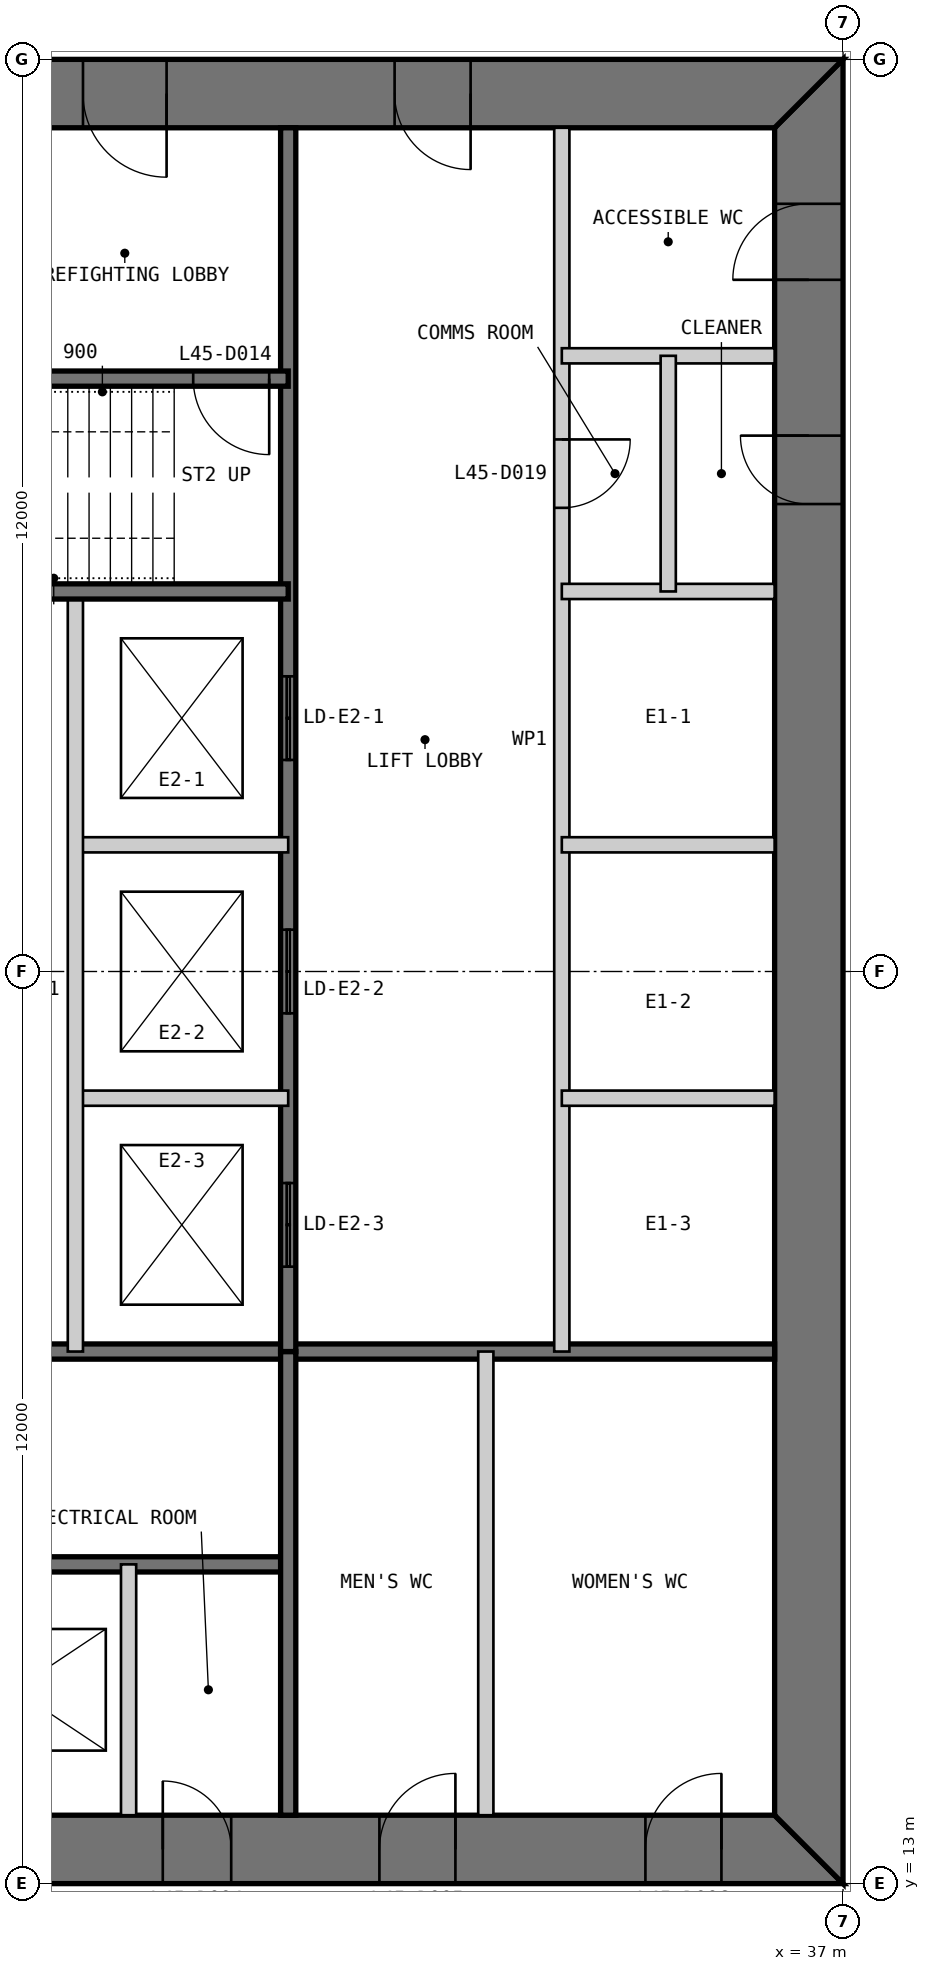
"""IFC4 building model, lengths in metres.
Left out: names, types, materials, properties, quantities, classifications, styles, units other than length and angle.
Written with IfcOpenShell. Run it as: python <this file> out.ifc"""

import sys

from ifc_helpers import new_model, si_unit, direction, frame, frame_2d, origin, place, context, subcontext, project, spatial, polyline, rectangle, outline, extrude, element, fill, save


model = new_model("IFC4")
c1 = context("Model", 3, precision=1e-05, world=origin(), true_north=direction((0.0, 1.0)))
c2 = subcontext(c1, "Body", "Model", "MODEL_VIEW")
j1 = project(units=[si_unit("LENGTHUNIT", "METRE"), si_unit("PLANEANGLEUNIT", "RADIAN")], contexts=[c1])
p1 = place(None, origin())
s1 = spatial("IfcSite", under=j1, at=p1, CompositionType="ELEMENT")
p2 = place(p1, origin())
s2 = spatial("IfcBuilding", under=s1, at=p2, CompositionType="ELEMENT")
p3 = place(p2, frame((0.0, 0.0, 193.8)))
s3 = spatial("IfcBuildingStorey", under=s2, at=p3, CompositionType="ELEMENT", Elevation=193.8)
p4 = place(p3, frame((13.0, 13.45, 0.0), z_axis=(0.0, 0.0, 1.0), x_axis=(1.0, 0.0, 0.0)))
e1 = element("IfcWall", 1, at=p4, inside=s3, PredefinedType="SHEAR", context=c2, shape_type="SweptSolid", body=[
    extrude(outline(polyline([(0.0, -0.45), (24.0, -0.45), (23.1, 0.45), (0.9, 0.45), (0.0, -0.45)])), origin(), (0.0, 0.0, 1.0), 4.0),
])
p5 = place(p4, frame((4.9, 0.0, 0.0)))
e2 = element("IfcOpeningElement", 2, at=p5, cuts=e1, PredefinedType="OPENING", context=c2, shape_type="SweptSolid", body=[
    extrude(rectangle(XDim=1.0, YDim=2.2, at=frame_2d((0.5, 1.1))), frame((0.0, 0.46, 0.0), z_axis=(0.0, -1.0, 0.0), x_axis=(1.0, 0.0, 0.0)), (0.0, 0.0, 1.0), 0.92),
])
p6 = place(p4, frame((8.9, 0.0, 0.0)))
e3 = element("IfcOpeningElement", 3, at=p6, cuts=e1, PredefinedType="OPENING", context=c2, shape_type="SweptSolid", body=[
    extrude(rectangle(XDim=1.1, YDim=2.2, at=frame_2d((0.55, 1.1))), frame((0.0, 0.46, 0.0), z_axis=(0.0, -1.0, 0.0), x_axis=(1.0, 0.0, 0.0)), (0.0, 0.0, 1.0), 0.92),
])
p7 = place(p4, frame((15.05, 0.0, 0.0)))
e4 = element("IfcOpeningElement", 4, at=p7, cuts=e1, PredefinedType="OPENING", context=c2, shape_type="SweptSolid", body=[
    extrude(rectangle(XDim=0.9, YDim=2.2, at=frame_2d((0.45, 1.1))), frame((0.0, 0.46, 0.0), z_axis=(0.0, -1.0, 0.0), x_axis=(1.0, 0.0, 0.0)), (0.0, 0.0, 1.0), 0.92),
])
p8 = place(p4, frame((17.9, 0.0, 0.0)))
e5 = element("IfcOpeningElement", 5, at=p8, cuts=e1, PredefinedType="OPENING", context=c2, shape_type="SweptSolid", body=[
    extrude(rectangle(XDim=1.0, YDim=2.2, at=frame_2d((0.5, 1.1))), frame((0.0, 0.46, 0.0), z_axis=(0.0, -1.0, 0.0), x_axis=(1.0, 0.0, 0.0)), (0.0, 0.0, 1.0), 0.92),
])
p9 = place(p4, frame((21.4, 0.0, 0.0)))
e6 = element("IfcOpeningElement", 6, at=p9, cuts=e1, PredefinedType="OPENING", context=c2, shape_type="SweptSolid", body=[
    extrude(rectangle(XDim=1.0, YDim=2.2, at=frame_2d((0.5, 1.1))), frame((0.0, 0.46, 0.0), z_axis=(0.0, -1.0, 0.0), x_axis=(1.0, 0.0, 0.0)), (0.0, 0.0, 1.0), 0.92),
])
p10 = place(p3, frame((36.55, 13.9, 0.0), z_axis=(0.0, 0.0, 1.0), x_axis=(0.0, 1.0, 0.0)))
e7 = element("IfcWall", 7, at=p10, inside=s3, PredefinedType="SHEAR", context=c2, shape_type="SweptSolid", body=[
    extrude(outline(polyline([(-0.9, -0.45), (23.1, -0.45), (22.2, 0.45), (0.0, 0.45), (-0.9, -0.45)])), origin(), (0.0, 0.0, 1.0), 4.0),
])
p11 = place(p10, frame((20.2, 0.0, 0.0)))
e8 = element("IfcOpeningElement", 8, at=p11, cuts=e7, PredefinedType="OPENING", context=c2, shape_type="SweptSolid", body=[
    extrude(rectangle(XDim=1.0, YDim=2.2, at=frame_2d((0.5, 1.1))), frame((0.0, 0.46, 0.0), z_axis=(0.0, -1.0, 0.0), x_axis=(1.0, 0.0, 0.0)), (0.0, 0.0, 1.0), 0.92),
])
p12 = place(p10, frame((17.25, 0.0, 0.0)))
e9 = element("IfcOpeningElement", 9, at=p12, cuts=e7, PredefinedType="OPENING", context=c2, shape_type="SweptSolid", body=[
    extrude(rectangle(XDim=0.9, YDim=2.2, at=frame_2d((0.45, 1.1))), frame((0.0, 0.46, 0.0), z_axis=(0.0, -1.0, 0.0), x_axis=(1.0, 0.0, 0.0)), (0.0, 0.0, 1.0), 0.92),
])
p13 = place(p3, frame((37.0, 36.55, 0.0), z_axis=(0.0, 0.0, 1.0), x_axis=(-1.0, 0.0, 0.0)))
e10 = element("IfcWall", 10, at=p13, inside=s3, PredefinedType="SHEAR", context=c2, shape_type="SweptSolid", body=[
    extrude(outline(polyline([(0.0, -0.45), (24.0, -0.45), (23.1, 0.45), (0.9, 0.45), (0.0, -0.45)])), origin(), (0.0, 0.0, 1.0), 4.0),
])
p14 = place(p13, frame((4.9, 0.0, 0.0)))
e11 = element("IfcOpeningElement", 11, at=p14, cuts=e10, PredefinedType="OPENING", context=c2, shape_type="SweptSolid", body=[
    extrude(rectangle(XDim=1.0, YDim=2.2, at=frame_2d((0.5, 1.1))), frame((0.0, 0.46, 0.0), z_axis=(0.0, -1.0, 0.0), x_axis=(1.0, 0.0, 0.0)), (0.0, 0.0, 1.0), 0.92),
])
p15 = place(p13, frame((8.9, 0.0, 0.0)))
e12 = element("IfcOpeningElement", 12, at=p15, cuts=e10, PredefinedType="OPENING", context=c2, shape_type="SweptSolid", body=[
    extrude(rectangle(XDim=1.1, YDim=2.2, at=frame_2d((0.55, 1.1))), frame((0.0, 0.46, 0.0), z_axis=(0.0, -1.0, 0.0), x_axis=(1.0, 0.0, 0.0)), (0.0, 0.0, 1.0), 0.92),
])
p16 = place(p13, frame((15.05, 0.0, 0.0)))
e13 = element("IfcOpeningElement", 13, at=p16, cuts=e10, PredefinedType="OPENING", context=c2, shape_type="SweptSolid", body=[
    extrude(rectangle(XDim=0.9, YDim=2.2, at=frame_2d((0.45, 1.1))), frame((0.0, 0.46, 0.0), z_axis=(0.0, -1.0, 0.0), x_axis=(1.0, 0.0, 0.0)), (0.0, 0.0, 1.0), 0.92),
])
p17 = place(p13, frame((17.9, 0.0, 0.0)))
e14 = element("IfcOpeningElement", 14, at=p17, cuts=e10, PredefinedType="OPENING", context=c2, shape_type="SweptSolid", body=[
    extrude(rectangle(XDim=1.0, YDim=2.2, at=frame_2d((0.5, 1.1))), frame((0.0, 0.46, 0.0), z_axis=(0.0, -1.0, 0.0), x_axis=(1.0, 0.0, 0.0)), (0.0, 0.0, 1.0), 0.92),
])
p18 = place(p13, frame((21.4, 0.0, 0.0)))
e15 = element("IfcOpeningElement", 15, at=p18, cuts=e10, PredefinedType="OPENING", context=c2, shape_type="SweptSolid", body=[
    extrude(rectangle(XDim=1.0, YDim=2.2, at=frame_2d((0.5, 1.1))), frame((0.0, 0.46, 0.0), z_axis=(0.0, -1.0, 0.0), x_axis=(1.0, 0.0, 0.0)), (0.0, 0.0, 1.0), 0.92),
])
p19 = place(p3, frame((20.3, 17.2, 0.0), z_axis=(0.0, 0.0, 1.0), x_axis=(1.0, 0.0, 0.0)))
e16 = element("IfcWall", 16, at=p19, inside=s3, PredefinedType="SOLIDWALL", context=c2, shape_type="SweptSolid", body=[
    extrude(rectangle(XDim=9.4, YDim=0.2, at=frame_2d((4.7, 0.0))), origin(), (0.0, 0.0, 1.0), 3.8),
])
p20 = place(p19, frame((0.25, 0.0, 0.0)))
e17 = element("IfcOpeningElement", 17, at=p20, cuts=e16, PredefinedType="OPENING", context=c2, shape_type="SweptSolid", body=[
    extrude(rectangle(XDim=1.0, YDim=2.2, at=frame_2d((0.5, 1.1))), frame((0.0, 0.11, 0.0), z_axis=(0.0, -1.0, 0.0), x_axis=(1.0, 0.0, 0.0)), (0.0, 0.0, 1.0), 0.22),
])
p21 = place(p3, frame((20.3, 20.0, 0.0), z_axis=(0.0, 0.0, 1.0), x_axis=(1.0, 0.0, 0.0)))
e18 = element("IfcWall", 18, at=p21, inside=s3, PredefinedType="SOLIDWALL", context=c2, shape_type="SweptSolid", body=[
    extrude(rectangle(XDim=15.8, YDim=0.2, at=frame_2d((7.9, 0.0))), origin(), (0.0, 0.0, 1.0), 3.8),
])
p22 = place(p3, frame((27.6, 13.9, 0.0), z_axis=(0.0, 0.0, 1.0), x_axis=(0.0, 1.0, 0.0)))
e19 = element("IfcWall", 19, at=p22, inside=s3, PredefinedType="PARTITIONING", context=c2, shape_type="SweptSolid", body=[
    extrude(rectangle(XDim=3.3, YDim=0.2, at=frame_2d((1.65, 0.0))), origin(), (0.0, 0.0, 1.0), 3.8),
])
p23 = place(p3, frame((29.7, 13.9, 0.0), z_axis=(0.0, 0.0, 1.0), x_axis=(0.0, 1.0, 0.0)))
e20 = element("IfcWall", 20, at=p23, inside=s3, PredefinedType="SOLIDWALL", context=c2, shape_type="SweptSolid", body=[
    extrude(rectangle(XDim=6.1, YDim=0.2, at=frame_2d((3.05, 0.0))), origin(), (0.0, 0.0, 1.0), 3.8),
])
p24 = place(p3, frame((32.3, 13.9, 0.0), z_axis=(0.0, 0.0, 1.0), x_axis=(0.0, 1.0, 0.0)))
e21 = element("IfcWall", 21, at=p24, inside=s3, PredefinedType="PARTITIONING", context=c2, shape_type="SweptSolid", body=[
    extrude(rectangle(XDim=6.1, YDim=0.2, at=frame_2d((3.05, 0.0))), origin(), (0.0, 0.0, 1.0), 3.8),
])
p25 = place(p3, frame((33.3, 36.1, 0.0), z_axis=(0.0, 0.0, 1.0), x_axis=(0.0, -1.0, 0.0)))
e22 = element("IfcWall", 22, at=p25, inside=s3, PredefinedType="PARTITIONING", context=c2, shape_type="SweptSolid", body=[
    extrude(rectangle(XDim=16.1, YDim=0.2, at=frame_2d((8.05, 0.0))), origin(), (0.0, 0.0, 1.0), 3.8),
])
p26 = place(p25, frame((4.1, 0.0, 0.0)))
e23 = element("IfcOpeningElement", 23, at=p26, cuts=e22, PredefinedType="OPENING", context=c2, shape_type="SweptSolid", body=[
    extrude(rectangle(XDim=0.9, YDim=2.2, at=frame_2d((0.45, 1.1))), frame((0.0, 0.11, 0.0), z_axis=(0.0, -1.0, 0.0), x_axis=(1.0, 0.0, 0.0)), (0.0, 0.0, 1.0), 0.22),
])
p27 = place(p3, frame((29.7, 36.1, 0.0), z_axis=(0.0, 0.0, 1.0), x_axis=(0.0, -1.0, 0.0)))
e24 = element("IfcWall", 24, at=p27, inside=s3, PredefinedType="SOLIDWALL", context=c2, shape_type="SweptSolid", body=[
    extrude(rectangle(XDim=16.1, YDim=0.2, at=frame_2d((8.05, 0.0))), origin(), (0.0, 0.0, 1.0), 3.8),
])
p28 = place(p27, frame((7.217, 0.0, 0.0)))
e25 = element("IfcOpeningElement", 25, at=p28, cuts=e24, PredefinedType="OPENING", context=c2, shape_type="SweptSolid", body=[
    extrude(rectangle(XDim=1.1, YDim=2.2, at=frame_2d((0.55, 1.1))), frame((0.0, 0.11, 0.0), z_axis=(0.0, -1.0, 0.0), x_axis=(1.0, 0.0, 0.0)), (0.0, 0.0, 1.0), 0.22),
])
p29 = place(p27, frame((10.55, 0.0, 0.0)))
e26 = element("IfcOpeningElement", 26, at=p29, cuts=e24, PredefinedType="OPENING", context=c2, shape_type="SweptSolid", body=[
    extrude(rectangle(XDim=1.1, YDim=2.2, at=frame_2d((0.55, 1.1))), frame((0.0, 0.11, 0.0), z_axis=(0.0, -1.0, 0.0), x_axis=(1.0, 0.0, 0.0)), (0.0, 0.0, 1.0), 0.22),
])
p30 = place(p27, frame((13.883, 0.0, 0.0)))
e27 = element("IfcOpeningElement", 27, at=p30, cuts=e24, PredefinedType="OPENING", context=c2, shape_type="SweptSolid", body=[
    extrude(rectangle(XDim=1.1, YDim=2.2, at=frame_2d((0.55, 1.1))), frame((0.0, 0.11, 0.0), z_axis=(0.0, -1.0, 0.0), x_axis=(1.0, 0.0, 0.0)), (0.0, 0.0, 1.0), 0.22),
])
for number, where, z_axis, x_axis in (
    (28, (36.1, 30.0, 0.0), (0.0, 0.0, 1.0), (-1.0, 0.0, 0.0)),
    (29, (36.1, 26.667, 0.0), (0.0, 0.0, 1.0), (-1.0, 0.0, 0.0)),
    (30, (36.1, 23.333, 0.0), (0.0, 0.0, 1.0), (-1.0, 0.0, 0.0)),
    (31, (29.7, 26.667, 0.0), (0.0, 0.0, 1.0), (-1.0, 0.0, 0.0)),
    (32, (29.7, 23.333, 0.0), (0.0, 0.0, 1.0), (-1.0, 0.0, 0.0)),
):
    element("IfcWall", number, at=place(p3, frame(where, z_axis=z_axis, x_axis=x_axis)), inside=s3, PredefinedType="PARTITIONING", context=c2, shape_type="SweptSolid", body=[
        extrude(rectangle(XDim=2.8, YDim=0.2, at=frame_2d((1.4, 0.0))), origin(), (0.0, 0.0, 1.0), 3.8),
    ])
p31 = place(p3, frame((26.9, 30.0, 0.0), z_axis=(0.0, 0.0, 1.0), x_axis=(0.0, -1.0, 0.0)))
e33 = element("IfcWall", 33, at=p31, inside=s3, PredefinedType="PARTITIONING", context=c2, shape_type="SweptSolid", body=[
    extrude(rectangle(XDim=10.0, YDim=0.2, at=frame_2d((5.0, 0.0))), origin(), (0.0, 0.0, 1.0), 3.8),
])
p32 = place(p3, frame((29.7, 32.8, 0.0), z_axis=(0.0, 0.0, 1.0), x_axis=(-1.0, 0.0, 0.0)))
e34 = element("IfcWall", 34, at=p32, inside=s3, PredefinedType="SOLIDWALL", context=c2, shape_type="SweptSolid", body=[
    extrude(rectangle(XDim=9.4, YDim=0.2, at=frame_2d((4.7, 0.0))), origin(), (0.0, 0.0, 1.0), 3.8),
])
p33 = place(p32, frame((0.25, 0.0, 0.0)))
e35 = element("IfcOpeningElement", 35, at=p33, cuts=e34, PredefinedType="OPENING", context=c2, shape_type="SweptSolid", body=[
    extrude(rectangle(XDim=1.0, YDim=2.2, at=frame_2d((0.5, 1.1))), frame((0.0, 0.11, 0.0), z_axis=(0.0, -1.0, 0.0), x_axis=(1.0, 0.0, 0.0)), (0.0, 0.0, 1.0), 0.22),
])
p34 = place(p3, frame((29.7, 30.0, 0.0), z_axis=(0.0, 0.0, 1.0), x_axis=(-1.0, 0.0, 0.0)))
e36 = element("IfcWall", 36, at=p34, inside=s3, PredefinedType="SOLIDWALL", context=c2, shape_type="SweptSolid", body=[
    extrude(rectangle(XDim=15.8, YDim=0.2, at=frame_2d((7.9, 0.0))), origin(), (0.0, 0.0, 1.0), 3.8),
])
p35 = place(p3, frame((36.1, 33.1, 0.0), z_axis=(0.0, 0.0, 1.0), x_axis=(-1.0, 0.0, 0.0)))
e37 = element("IfcWall", 37, at=p35, inside=s3, PredefinedType="PARTITIONING", context=c2, shape_type="SweptSolid", body=[
    extrude(rectangle(XDim=2.8, YDim=0.2, at=frame_2d((1.4, 0.0))), origin(), (0.0, 0.0, 1.0), 3.8),
])
p36 = place(p3, frame((34.7, 33.1, 0.0), z_axis=(0.0, 0.0, 1.0), x_axis=(0.0, -1.0, 0.0)))
e38 = element("IfcWall", 38, at=p36, inside=s3, PredefinedType="PARTITIONING", context=c2, shape_type="SweptSolid", body=[
    extrude(rectangle(XDim=3.1, YDim=0.2, at=frame_2d((1.55, 0.0))), origin(), (0.0, 0.0, 1.0), 3.8),
])
p37 = place(p7, origin())
e39 = element("IfcDoor", 39, at=p37, inside=s3, OperationType="SINGLE_SWING_LEFT", PredefinedType="DOOR", context=c2, shape_type="SweptSolid", body=[
    extrude(rectangle(XDim=0.9, YDim=2.2, at=frame_2d((0.45, 1.1))), frame((0.0, 0.025, 0.0), z_axis=(0.0, -1.0, 0.0), x_axis=(1.0, 0.0, 0.0)), (0.0, 0.0, 1.0), 0.05),
    extrude(outline(polyline([(0.0, 0.0), (0.04, 0.0), (0.04, 2.16), (0.86, 2.16), (0.86, 0.0), (0.9, 0.0), (0.9, 2.2), (0.0, 2.2), (0.0, 0.0)])), frame((0.0, 0.3, 0.0), z_axis=(0.0, -1.0, 0.0), x_axis=(1.0, 0.0, 0.0)), (0.0, 0.0, 1.0), 0.6),
])
fill(e4, e39)
p38 = place(p8, origin())
e40 = element("IfcDoor", 40, at=p38, inside=s3, OperationType="SINGLE_SWING_RIGHT", PredefinedType="DOOR", context=c2, shape_type="SweptSolid", body=[
    extrude(rectangle(XDim=1.0, YDim=2.2, at=frame_2d((0.5, 1.1))), frame((0.0, 0.025, 0.0), z_axis=(0.0, -1.0, 0.0), x_axis=(1.0, 0.0, 0.0)), (0.0, 0.0, 1.0), 0.05),
    extrude(outline(polyline([(0.0, 0.0), (0.04, 0.0), (0.04, 2.16), (0.96, 2.16), (0.96, 0.0), (1.0, 0.0), (1.0, 2.2), (0.0, 2.2), (0.0, 0.0)])), frame((0.0, 0.3, 0.0), z_axis=(0.0, -1.0, 0.0), x_axis=(1.0, 0.0, 0.0)), (0.0, 0.0, 1.0), 0.6),
])
fill(e5, e40)
p39 = place(p9, origin())
e41 = element("IfcDoor", 41, at=p39, inside=s3, OperationType="SINGLE_SWING_RIGHT", PredefinedType="DOOR", context=c2, shape_type="SweptSolid", body=[
    extrude(rectangle(XDim=1.0, YDim=2.2, at=frame_2d((0.5, 1.1))), frame((0.0, 0.025, 0.0), z_axis=(0.0, -1.0, 0.0), x_axis=(1.0, 0.0, 0.0)), (0.0, 0.0, 1.0), 0.05),
    extrude(outline(polyline([(0.0, 0.0), (0.04, 0.0), (0.04, 2.16), (0.96, 2.16), (0.96, 0.0), (1.0, 0.0), (1.0, 2.2), (0.0, 2.2), (0.0, 0.0)])), frame((0.0, 0.3, 0.0), z_axis=(0.0, -1.0, 0.0), x_axis=(1.0, 0.0, 0.0)), (0.0, 0.0, 1.0), 0.6),
])
fill(e6, e41)
p40 = place(p14, origin())
e42 = element("IfcDoor", 42, at=p40, inside=s3, OperationType="SINGLE_SWING_LEFT", PredefinedType="DOOR", context=c2, shape_type="SweptSolid", body=[
    extrude(rectangle(XDim=1.0, YDim=2.2, at=frame_2d((0.5, 1.1))), frame((0.0, 0.025, 0.0), z_axis=(0.0, -1.0, 0.0), x_axis=(1.0, 0.0, 0.0)), (0.0, 0.0, 1.0), 0.05),
    extrude(outline(polyline([(0.0, 0.0), (0.04, 0.0), (0.04, 2.16), (0.96, 2.16), (0.96, 0.0), (1.0, 0.0), (1.0, 2.2), (0.0, 2.2), (0.0, 0.0)])), frame((0.0, 0.3, 0.0), z_axis=(0.0, -1.0, 0.0), x_axis=(1.0, 0.0, 0.0)), (0.0, 0.0, 1.0), 0.6),
])
fill(e11, e42)
p41 = place(p15, origin())
e43 = element("IfcDoor", 43, at=p41, inside=s3, OperationType="SINGLE_SWING_LEFT", PredefinedType="DOOR", context=c2, shape_type="SweptSolid", body=[
    extrude(rectangle(XDim=1.1, YDim=2.2, at=frame_2d((0.55, 1.1))), frame((0.0, 0.025, 0.0), z_axis=(0.0, -1.0, 0.0), x_axis=(1.0, 0.0, 0.0)), (0.0, 0.0, 1.0), 0.05),
    extrude(outline(polyline([(0.0, 0.0), (0.04, 0.0), (0.04, 2.16), (1.06, 2.16), (1.06, 0.0), (1.1, 0.0), (1.1, 2.2), (0.0, 2.2), (0.0, 0.0)])), frame((0.0, 0.3, 0.0), z_axis=(0.0, -1.0, 0.0), x_axis=(1.0, 0.0, 0.0)), (0.0, 0.0, 1.0), 0.6),
])
fill(e12, e43)
p42 = place(p33, origin())
e44 = element("IfcDoor", 44, at=p42, inside=s3, OperationType="SINGLE_SWING_LEFT", PredefinedType="DOOR", context=c2, shape_type="SweptSolid", body=[
    extrude(rectangle(XDim=1.0, YDim=2.2, at=frame_2d((0.5, 1.1))), frame((0.0, 0.025, 0.0), z_axis=(0.0, -1.0, 0.0), x_axis=(1.0, 0.0, 0.0)), (0.0, 0.0, 1.0), 0.05),
])
fill(e35, e44)
p43 = place(p11, origin())
e45 = element("IfcDoor", 45, at=p43, inside=s3, OperationType="SINGLE_SWING_LEFT", PredefinedType="DOOR", context=c2, shape_type="SweptSolid", body=[
    extrude(rectangle(XDim=1.0, YDim=2.2, at=frame_2d((0.5, 1.1))), frame((0.0, 0.025, 0.0), z_axis=(0.0, -1.0, 0.0), x_axis=(1.0, 0.0, 0.0)), (0.0, 0.0, 1.0), 0.05),
    extrude(outline(polyline([(0.0, 0.0), (0.04, 0.0), (0.04, 2.16), (0.96, 2.16), (0.96, 0.0), (1.0, 0.0), (1.0, 2.2), (0.0, 2.2), (0.0, 0.0)])), frame((0.0, 0.3, 0.0), z_axis=(0.0, -1.0, 0.0), x_axis=(1.0, 0.0, 0.0)), (0.0, 0.0, 1.0), 0.6),
])
fill(e8, e45)
p44 = place(p26, origin())
e46 = element("IfcDoor", 46, at=p44, inside=s3, OperationType="SINGLE_SWING_LEFT", PredefinedType="DOOR", context=c2, shape_type="SweptSolid", body=[
    extrude(rectangle(XDim=0.9, YDim=2.2, at=frame_2d((0.45, 1.1))), frame((0.0, 0.025, 0.0), z_axis=(0.0, -1.0, 0.0), x_axis=(1.0, 0.0, 0.0)), (0.0, 0.0, 1.0), 0.05),
])
fill(e23, e46)
p45 = place(p12, origin())
e47 = element("IfcDoor", 47, at=p45, inside=s3, OperationType="SINGLE_SWING_RIGHT", PredefinedType="DOOR", context=c2, shape_type="SweptSolid", body=[
    extrude(rectangle(XDim=0.9, YDim=2.2, at=frame_2d((0.45, 1.1))), frame((0.0, 0.025, 0.0), z_axis=(0.0, -1.0, 0.0), x_axis=(1.0, 0.0, 0.0)), (0.0, 0.0, 1.0), 0.05),
    extrude(outline(polyline([(0.0, 0.0), (0.04, 0.0), (0.04, 2.16), (0.86, 2.16), (0.86, 0.0), (0.9, 0.0), (0.9, 2.2), (0.0, 2.2), (0.0, 0.0)])), frame((0.0, 0.3, 0.0), z_axis=(0.0, -1.0, 0.0), x_axis=(1.0, 0.0, 0.0)), (0.0, 0.0, 1.0), 0.6),
])
fill(e9, e47)
p46 = place(p28, origin())
e48 = element("IfcDoor", 48, at=p46, inside=s3, OperationType="DOUBLE_DOOR_SLIDING", PredefinedType="DOOR", context=c2, shape_type="SweptSolid", body=[
    extrude(rectangle(XDim=1.1, YDim=2.2, at=frame_2d((0.55, 1.1))), frame((0.0, 0.025, 0.0), z_axis=(0.0, -1.0, 0.0), x_axis=(1.0, 0.0, 0.0)), (0.0, 0.0, 1.0), 0.05),
])
fill(e25, e48)
p47 = place(p29, origin())
e49 = element("IfcDoor", 49, at=p47, inside=s3, OperationType="DOUBLE_DOOR_SLIDING", PredefinedType="DOOR", context=c2, shape_type="SweptSolid", body=[
    extrude(rectangle(XDim=1.1, YDim=2.2, at=frame_2d((0.55, 1.1))), frame((0.0, 0.025, 0.0), z_axis=(0.0, -1.0, 0.0), x_axis=(1.0, 0.0, 0.0)), (0.0, 0.0, 1.0), 0.05),
])
fill(e26, e49)
p48 = place(p30, origin())
e50 = element("IfcDoor", 50, at=p48, inside=s3, OperationType="DOUBLE_DOOR_SLIDING", PredefinedType="DOOR", context=c2, shape_type="SweptSolid", body=[
    extrude(rectangle(XDim=1.1, YDim=2.2, at=frame_2d((0.55, 1.1))), frame((0.0, 0.025, 0.0), z_axis=(0.0, -1.0, 0.0), x_axis=(1.0, 0.0, 0.0)), (0.0, 0.0, 1.0), 0.05),
])
fill(e27, e50)
save(model, sys.argv[1])
